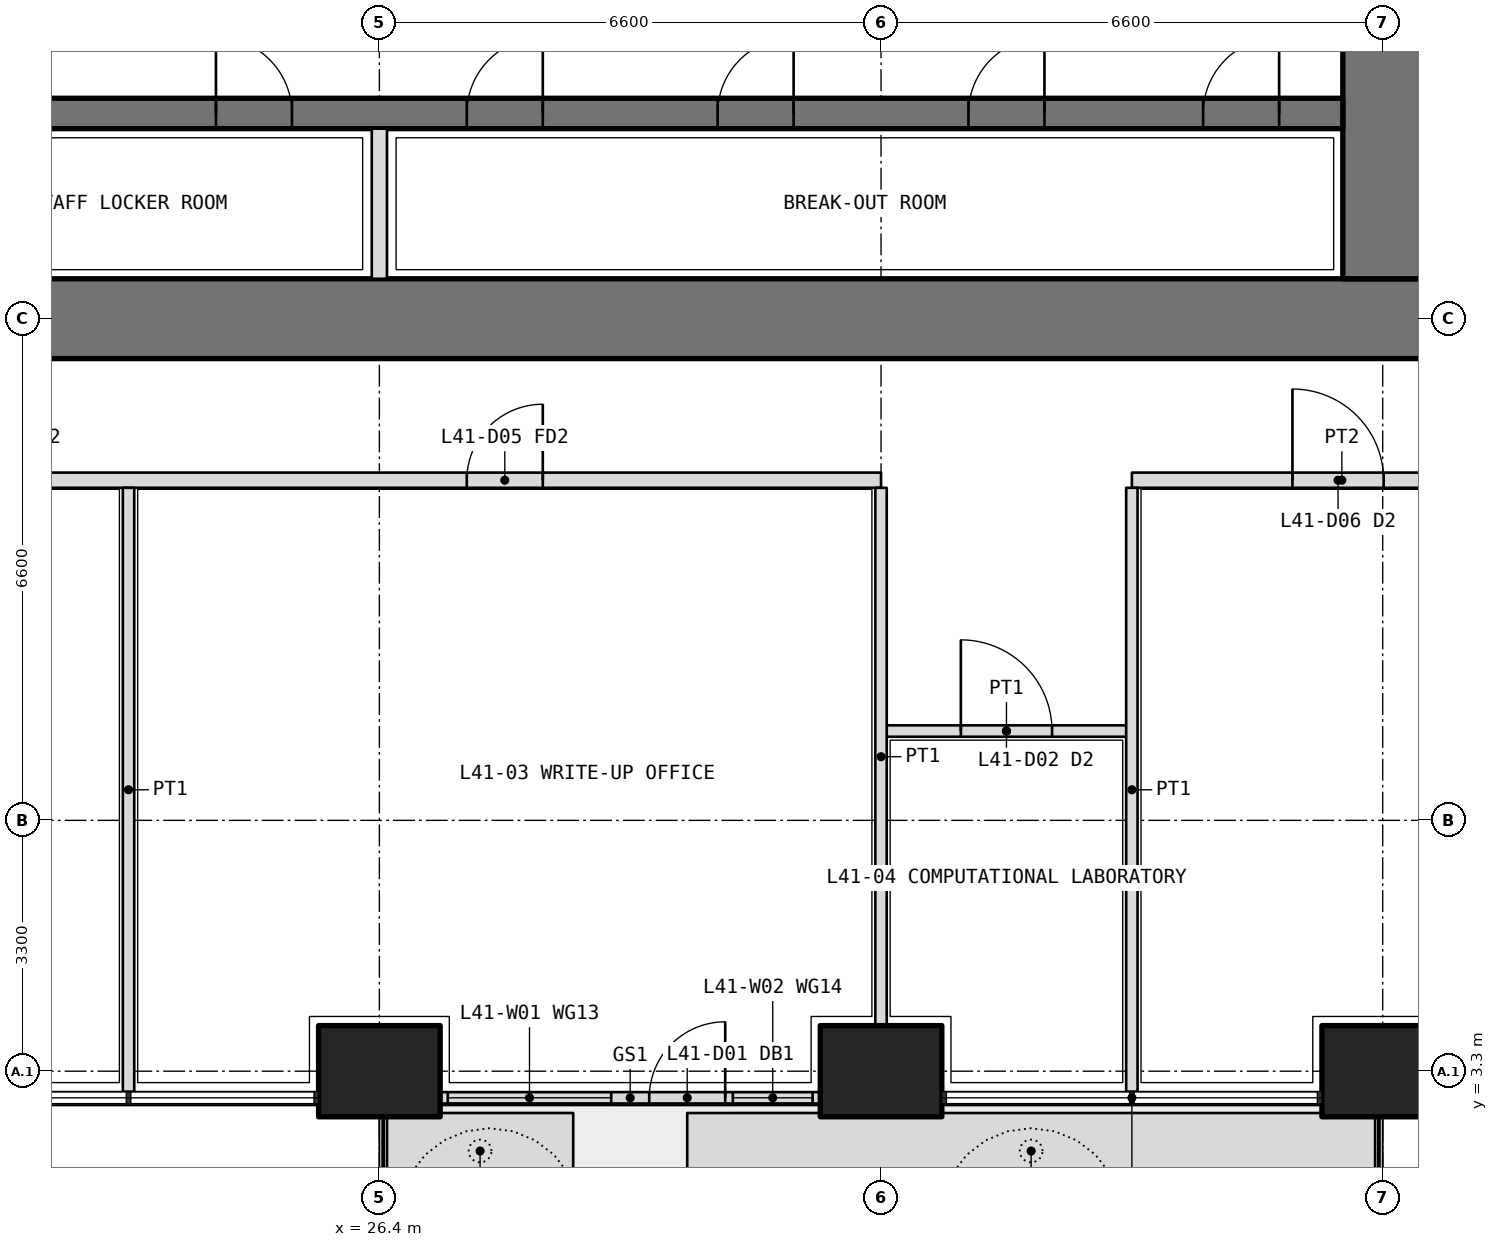
"""IFC4 building model, lengths in metres.
Left out: names, types, materials, properties, quantities, classifications, styles, units other than length and angle.
Written with IfcOpenShell. Run it as: python <this file> out.ifc"""

import sys

from ifc_helpers import new_model, si_unit, direction, frame, frame_2d, origin, origin_2d, place, context, subcontext, project, spatial, polyline, rectangle, outline, extrude, element, fill, save


model = new_model("IFC4")
c1 = context("Model", 3, precision=1e-05, world=origin(), true_north=direction((0.0, 1.0)))
c2 = subcontext(c1, "Body", "Model", "MODEL_VIEW")
j1 = project(units=[si_unit("LENGTHUNIT", "METRE"), si_unit("PLANEANGLEUNIT", "RADIAN")], contexts=[c1])
p1 = place(None, origin())
s1 = spatial("IfcSite", under=j1, at=p1, CompositionType="ELEMENT")
p2 = place(p1, origin())
s2 = spatial("IfcBuilding", under=s1, at=p2, CompositionType="ELEMENT")
p3 = place(p2, frame((0.0, 0.0, 180.9)))
s3 = spatial("IfcBuildingStorey", under=s2, at=p3, CompositionType="ELEMENT", Elevation=180.9)
for number, where, z_axis, x_axis in (
    (1, (26.4, 3.3, 0.0), (0.0, 0.0, 1.0), (1.0, 0.0, 0.0)),
    (2, (33.0, 3.3, 0.0), (0.0, 0.0, 1.0), (1.0, 0.0, 0.0)),
    (3, (39.6, 3.3, 0.0), (0.0, 0.0, 1.0), (1.0, 0.0, 0.0)),
):
    element("IfcColumn", number, at=place(p3, frame(where, z_axis=z_axis, x_axis=x_axis)), inside=s3, PredefinedType="COLUMN", context=c2, shape_type="SweptSolid", body=[
        extrude(rectangle(XDim=1.6, YDim=1.2, at=origin_2d()), origin(), (0.0, 0.0, 1.0), 4.2),
    ])
p4 = place(p3, origin())
e4 = element("IfcWall", 4, at=p4, inside=s3, PredefinedType="USERDEFINED", context=c2, shape_type="SweptSolid", body=[
    extrude(outline(polyline([(26.5, 1.75), (28.95, 1.75), (28.95, 2.75), (26.5, 2.75), (26.5, 1.75)]), holes=[polyline([(26.65, 1.9), (28.8, 1.9), (28.8, 2.6), (26.65, 2.6), (26.65, 1.9)])]), origin(), (0.0, 0.0, 1.0), 1.05),
])
p5 = place(p3, origin())
e5 = element("IfcWall", 5, at=p5, inside=s3, PredefinedType="USERDEFINED", context=c2, shape_type="SweptSolid", body=[
    extrude(outline(polyline([(30.45, 1.75), (39.5, 1.75), (39.5, 2.75), (30.45, 2.75), (30.45, 1.75)]), holes=[polyline([(30.6, 1.9), (39.35, 1.9), (39.35, 2.6), (30.6, 2.6), (30.6, 1.9)])]), origin(), (0.0, 0.0, 1.0), 1.05),
])
p6 = place(p3, frame((27.2, 2.95, 0.0), z_axis=(0.0, 0.0, 1.0), x_axis=(1.0, 0.0, 0.0)))
e6 = element("IfcWall", 6, at=p6, inside=s3, PredefinedType="SOLIDWALL", context=c2, shape_type="SweptSolid", body=[
    extrude(rectangle(XDim=5.0, YDim=0.15, at=frame_2d((2.5, 0.0))), origin(), (0.0, 0.0, 1.0), 2.7),
])
p7 = place(p6, frame((2.75, 0.0, 0.0)))
e7 = element("IfcOpeningElement", 7, at=p7, cuts=e6, PredefinedType="OPENING", context=c2, shape_type="SweptSolid", body=[
    extrude(rectangle(XDim=1.0, YDim=2.4, at=frame_2d((0.5, 1.2))), frame((0.0, 0.085, 0.0), z_axis=(0.0, -1.0, 0.0), x_axis=(1.0, 0.0, 0.0)), (0.0, 0.0, 1.0), 0.17),
])
p8 = place(p6, frame((0.1, 0.0, 0.1)))
e8 = element("IfcOpeningElement", 8, at=p8, cuts=e6, PredefinedType="OPENING", context=c2, shape_type="SweptSolid", body=[
    extrude(rectangle(XDim=2.15, YDim=2.3, at=frame_2d((1.075, 1.15))), frame((0.0, 0.085, 0.0), z_axis=(0.0, -1.0, 0.0), x_axis=(1.0, 0.0, 0.0)), (0.0, 0.0, 1.0), 0.17),
])
p9 = place(p6, frame((3.85, 0.0, 0.1)))
e9 = element("IfcOpeningElement", 9, at=p9, cuts=e6, PredefinedType="OPENING", context=c2, shape_type="SweptSolid", body=[
    extrude(rectangle(XDim=1.05, YDim=2.3, at=frame_2d((0.525, 1.15))), frame((0.0, 0.085, 0.0), z_axis=(0.0, -1.0, 0.0), x_axis=(1.0, 0.0, 0.0)), (0.0, 0.0, 1.0), 0.17),
])
p10 = place(p3, frame((12.675, 13.2, 0.0), z_axis=(0.0, 0.0, 1.0), x_axis=(1.0, 0.0, 0.0)))
e10 = element("IfcWall", 10, at=p10, inside=s3, PredefinedType="SHEAR", context=c2, shape_type="SweptSolid", body=[
    extrude(rectangle(XDim=27.45, YDim=1.05, at=frame_2d((13.725, 0.0))), origin(), (0.0, 0.0, 1.0), 4.2),
])
p11 = place(p3, frame((39.6, 13.725, 0.0), z_axis=(0.0, 0.0, 1.0), x_axis=(0.0, 1.0, 0.0)))
e11 = element("IfcWall", 11, at=p11, inside=s3, PredefinedType="SHEAR", context=c2, shape_type="SweptSolid", body=[
    extrude(rectangle(XDim=18.75, YDim=1.05, at=frame_2d((9.375, 0.0))), origin(), (0.0, 0.0, 1.0), 4.2),
])
p12 = place(p11, frame((3.025, 0.0, 0.0)))
e12 = element("IfcOpeningElement", 12, at=p12, cuts=e11, PredefinedType="OPENING", context=c2, shape_type="SweptSolid", body=[
    extrude(rectangle(XDim=1.6, YDim=2.1, at=frame_2d((0.8, 1.05))), frame((0.0, 0.535, 0.0), z_axis=(0.0, -1.0, 0.0), x_axis=(1.0, 0.0, 0.0)), (0.0, 0.0, 1.0), 1.07),
])
p13 = place(p11, frame((13.825, 0.0, 0.0)))
e13 = element("IfcOpeningElement", 13, at=p13, cuts=e11, PredefinedType="OPENING", context=c2, shape_type="SweptSolid", body=[
    extrude(rectangle(XDim=1.6, YDim=2.1, at=frame_2d((0.8, 1.05))), frame((0.0, 0.535, 0.0), z_axis=(0.0, -1.0, 0.0), x_axis=(1.0, 0.0, 0.0)), (0.0, 0.0, 1.0), 1.07),
])
p14 = place(p3, frame((13.725, 15.9, 0.0), z_axis=(0.0, 0.0, 1.0), x_axis=(1.0, 0.0, 0.0)))
e14 = element("IfcWall", 14, at=p14, inside=s3, PredefinedType="SHEAR", context=c2, shape_type="SweptSolid", body=[
    extrude(rectangle(XDim=25.35, YDim=0.4, at=frame_2d((12.675, 0.0))), origin(), (0.0, 0.0, 1.0), 4.2),
])
p15 = place(p14, frame((0.837, 0.0, 0.0)))
e15 = element("IfcOpeningElement", 15, at=p15, cuts=e14, PredefinedType="OPENING", context=c2, shape_type="SweptSolid", body=[
    extrude(rectangle(XDim=1.0, YDim=2.1, at=frame_2d((0.5, 1.05))), frame((0.0, 0.21, 0.0), z_axis=(0.0, -1.0, 0.0), x_axis=(1.0, 0.0, 0.0)), (0.0, 0.0, 1.0), 0.42),
])
p16 = place(p14, frame((3.925, 0.0, 0.0)))
e16 = element("IfcOpeningElement", 16, at=p16, cuts=e14, PredefinedType="OPENING", context=c2, shape_type="SweptSolid", body=[
    extrude(rectangle(XDim=1.0, YDim=2.1, at=frame_2d((0.5, 1.05))), frame((0.0, 0.21, 0.0), z_axis=(0.0, -1.0, 0.0), x_axis=(1.0, 0.0, 0.0)), (0.0, 0.0, 1.0), 0.42),
])
p17 = place(p14, frame((7.225, 0.0, 0.0)))
e17 = element("IfcOpeningElement", 17, at=p17, cuts=e14, PredefinedType="OPENING", context=c2, shape_type="SweptSolid", body=[
    extrude(rectangle(XDim=1.0, YDim=2.1, at=frame_2d((0.5, 1.05))), frame((0.0, 0.21, 0.0), z_axis=(0.0, -1.0, 0.0), x_axis=(1.0, 0.0, 0.0)), (0.0, 0.0, 1.0), 0.42),
])
p18 = place(p14, frame((10.525, 0.0, 0.0)))
e18 = element("IfcOpeningElement", 18, at=p18, cuts=e14, PredefinedType="OPENING", context=c2, shape_type="SweptSolid", body=[
    extrude(rectangle(XDim=1.0, YDim=2.1, at=frame_2d((0.5, 1.05))), frame((0.0, 0.21, 0.0), z_axis=(0.0, -1.0, 0.0), x_axis=(1.0, 0.0, 0.0)), (0.0, 0.0, 1.0), 0.42),
])
p19 = place(p14, frame((13.825, 0.0, 0.0)))
e19 = element("IfcOpeningElement", 19, at=p19, cuts=e14, PredefinedType="OPENING", context=c2, shape_type="SweptSolid", body=[
    extrude(rectangle(XDim=1.0, YDim=2.1, at=frame_2d((0.5, 1.05))), frame((0.0, 0.21, 0.0), z_axis=(0.0, -1.0, 0.0), x_axis=(1.0, 0.0, 0.0)), (0.0, 0.0, 1.0), 0.42),
])
p20 = place(p14, frame((17.125, 0.0, 0.0)))
e20 = element("IfcOpeningElement", 20, at=p20, cuts=e14, PredefinedType="OPENING", context=c2, shape_type="SweptSolid", body=[
    extrude(rectangle(XDim=1.0, YDim=2.1, at=frame_2d((0.5, 1.05))), frame((0.0, 0.21, 0.0), z_axis=(0.0, -1.0, 0.0), x_axis=(1.0, 0.0, 0.0)), (0.0, 0.0, 1.0), 0.42),
])
p21 = place(p14, frame((20.425, 0.0, 0.0)))
e21 = element("IfcOpeningElement", 21, at=p21, cuts=e14, PredefinedType="OPENING", context=c2, shape_type="SweptSolid", body=[
    extrude(rectangle(XDim=1.0, YDim=2.1, at=frame_2d((0.5, 1.05))), frame((0.0, 0.21, 0.0), z_axis=(0.0, -1.0, 0.0), x_axis=(1.0, 0.0, 0.0)), (0.0, 0.0, 1.0), 0.42),
])
p22 = place(p14, frame((23.512, 0.0, 0.0)))
e22 = element("IfcOpeningElement", 22, at=p22, cuts=e14, PredefinedType="OPENING", context=c2, shape_type="SweptSolid", body=[
    extrude(rectangle(XDim=1.0, YDim=2.1, at=frame_2d((0.5, 1.05))), frame((0.0, 0.21, 0.0), z_axis=(0.0, -1.0, 0.0), x_axis=(1.0, 0.0, 0.0)), (0.0, 0.0, 1.0), 0.42),
])
p23 = place(p3, frame((26.4, 13.725, 0.0), z_axis=(0.0, 0.0, 1.0), x_axis=(0.0, 1.0, 0.0)))
e23 = element("IfcWall", 23, at=p23, inside=s3, PredefinedType="PARTITIONING", context=c2, shape_type="SweptSolid", body=[
    extrude(rectangle(XDim=1.975, YDim=0.2, at=frame_2d((0.987, 0.0))), origin(), (0.0, 0.0, 1.0), 4.2),
])
p24 = place(p3, frame((10.975, 11.075, 0.0), z_axis=(0.0, 0.0, 1.0), x_axis=(1.0, 0.0, 0.0)))
e24 = element("IfcWall", 24, at=p24, inside=s3, PredefinedType="PARTITIONING", context=c2, shape_type="SweptSolid", body=[
    extrude(rectangle(XDim=22.025, YDim=0.2, at=frame_2d((11.012, 0.0))), origin(), (0.0, 0.0, 1.0), 2.85),
])
p25 = place(p24, frame((0.562, 0.0, 0.0)))
e25 = element("IfcOpeningElement", 25, at=p25, cuts=e24, PredefinedType="OPENING", context=c2, shape_type="SweptSolid", body=[
    extrude(rectangle(XDim=1.2, YDim=2.1, at=frame_2d((0.6, 1.05))), frame((0.0, 0.11, 0.0), z_axis=(0.0, -1.0, 0.0), x_axis=(1.0, 0.0, 0.0)), (0.0, 0.0, 1.0), 0.22),
])
p26 = place(p24, frame((6.675, 0.0, 0.0)))
e26 = element("IfcOpeningElement", 26, at=p26, cuts=e24, PredefinedType="OPENING", context=c2, shape_type="SweptSolid", body=[
    extrude(rectangle(XDim=1.0, YDim=2.1, at=frame_2d((0.5, 1.05))), frame((0.0, 0.11, 0.0), z_axis=(0.0, -1.0, 0.0), x_axis=(1.0, 0.0, 0.0)), (0.0, 0.0, 1.0), 0.22),
])
p27 = place(p24, frame((16.575, 0.0, 0.0)))
e27 = element("IfcOpeningElement", 27, at=p27, cuts=e24, PredefinedType="OPENING", context=c2, shape_type="SweptSolid", body=[
    extrude(rectangle(XDim=1.0, YDim=2.1, at=frame_2d((0.5, 1.05))), frame((0.0, 0.11, 0.0), z_axis=(0.0, -1.0, 0.0), x_axis=(1.0, 0.0, 0.0)), (0.0, 0.0, 1.0), 0.22),
])
p28 = place(p3, frame((36.3, 11.075, 0.0), z_axis=(0.0, 0.0, 1.0), x_axis=(1.0, 0.0, 0.0)))
e28 = element("IfcWall", 28, at=p28, inside=s3, PredefinedType="PARTITIONING", context=c2, shape_type="SweptSolid", body=[
    extrude(rectangle(XDim=5.525, YDim=0.2, at=frame_2d((2.762, 0.0))), origin(), (0.0, 0.0, 1.0), 2.85),
])
p29 = place(p28, frame((2.113, 0.0, 0.0)))
e29 = element("IfcOpeningElement", 29, at=p29, cuts=e28, PredefinedType="OPENING", context=c2, shape_type="SweptSolid", body=[
    extrude(rectangle(XDim=1.2, YDim=2.1, at=frame_2d((0.6, 1.05))), frame((0.0, 0.11, 0.0), z_axis=(0.0, -1.0, 0.0), x_axis=(1.0, 0.0, 0.0)), (0.0, 0.0, 1.0), 0.22),
])
p30 = place(p3, frame((33.0, 7.775, 0.0), z_axis=(0.0, 0.0, 1.0), x_axis=(1.0, 0.0, 0.0)))
e30 = element("IfcWall", 30, at=p30, inside=s3, PredefinedType="PARTITIONING", context=c2, shape_type="SweptSolid", body=[
    extrude(rectangle(XDim=3.3, YDim=0.15, at=frame_2d((1.65, 0.0))), origin(), (0.0, 0.0, 1.0), 2.85),
])
p31 = place(p30, frame((1.05, 0.0, 0.0)))
e31 = element("IfcOpeningElement", 31, at=p31, cuts=e30, PredefinedType="OPENING", context=c2, shape_type="SweptSolid", body=[
    extrude(rectangle(XDim=1.2, YDim=2.1, at=frame_2d((0.6, 1.05))), frame((0.0, 0.085, 0.0), z_axis=(0.0, -1.0, 0.0), x_axis=(1.0, 0.0, 0.0)), (0.0, 0.0, 1.0), 0.17),
])
p32 = place(p3, frame((23.1, 3.03, 0.0), z_axis=(0.0, 0.0, 1.0), x_axis=(0.0, 1.0, 0.0)))
e32 = element("IfcWall", 32, at=p32, inside=s3, PredefinedType="PARTITIONING", context=c2, shape_type="SweptSolid", body=[
    extrude(rectangle(XDim=7.945, YDim=0.15, at=frame_2d((3.973, 0.0))), origin(), (0.0, 0.0, 1.0), 2.7),
])
p33 = place(p3, frame((33.0, 3.9, 0.0), z_axis=(0.0, 0.0, 1.0), x_axis=(0.0, 1.0, 0.0)))
e33 = element("IfcWall", 33, at=p33, inside=s3, PredefinedType="PARTITIONING", context=c2, shape_type="SweptSolid", body=[
    extrude(rectangle(XDim=7.075, YDim=0.15, at=frame_2d((3.538, 0.0))), origin(), (0.0, 0.0, 1.0), 2.85),
])
p34 = place(p3, frame((36.3, 3.03, 0.0), z_axis=(0.0, 0.0, 1.0), x_axis=(0.0, 1.0, 0.0)))
e34 = element("IfcWall", 34, at=p34, inside=s3, PredefinedType="PARTITIONING", context=c2, shape_type="SweptSolid", body=[
    extrude(rectangle(XDim=7.945, YDim=0.15, at=frame_2d((3.973, 0.0))), origin(), (0.0, 0.0, 1.0), 2.7),
])
p35 = place(p7, origin())
e35 = element("IfcDoor", 35, at=p35, inside=s3, OperationType="SINGLE_SWING_RIGHT", PredefinedType="DOOR", context=c2, shape_type="SweptSolid", body=[
    extrude(rectangle(XDim=1.0, YDim=2.4, at=frame_2d((0.5, 1.2))), frame((0.0, 0.025, 0.0), z_axis=(0.0, -1.0, 0.0), x_axis=(1.0, 0.0, 0.0)), (0.0, 0.0, 1.0), 0.05),
])
fill(e7, e35)
p36 = place(p8, origin())
e36 = element("IfcWindow", 36, at=p36, inside=s3, PartitioningType="SINGLE_PANEL", PredefinedType="WINDOW", context=c2, shape_type="SweptSolid", body=[
    extrude(rectangle(XDim=2.15, YDim=2.3, at=frame_2d((1.075, 1.15))), frame((0.0, 0.03, 0.0), z_axis=(0.0, -1.0, 0.0), x_axis=(1.0, 0.0, 0.0)), (0.0, 0.0, 1.0), 0.06),
])
fill(e8, e36)
p37 = place(p9, origin())
e37 = element("IfcWindow", 37, at=p37, inside=s3, PartitioningType="SINGLE_PANEL", PredefinedType="WINDOW", context=c2, shape_type="SweptSolid", body=[
    extrude(rectangle(XDim=1.05, YDim=2.3, at=frame_2d((0.525, 1.15))), frame((0.0, 0.03, 0.0), z_axis=(0.0, -1.0, 0.0), x_axis=(1.0, 0.0, 0.0)), (0.0, 0.0, 1.0), 0.06),
])
fill(e9, e37)
p38 = place(p27, origin())
e38 = element("IfcDoor", 38, at=p38, inside=s3, OperationType="SINGLE_SWING_RIGHT", PredefinedType="DOOR", context=c2, shape_type="SweptSolid", body=[
    extrude(rectangle(XDim=1.0, YDim=2.1, at=frame_2d((0.5, 1.05))), frame((0.0, 0.025, 0.0), z_axis=(0.0, -1.0, 0.0), x_axis=(1.0, 0.0, 0.0)), (0.0, 0.0, 1.0), 0.05),
])
fill(e27, e38)
p39 = place(p31, origin())
e39 = element("IfcDoor", 39, at=p39, inside=s3, OperationType="DOUBLE_DOOR_SINGLE_SWING", PredefinedType="DOOR", context=c2, shape_type="SweptSolid", body=[
    extrude(rectangle(XDim=1.2, YDim=2.1, at=frame_2d((0.6, 1.05))), frame((0.0, 0.025, 0.0), z_axis=(0.0, -1.0, 0.0), x_axis=(1.0, 0.0, 0.0)), (0.0, 0.0, 1.0), 0.05),
])
fill(e31, e39)
p40 = place(p29, origin())
e40 = element("IfcDoor", 40, at=p40, inside=s3, OperationType="DOUBLE_DOOR_SINGLE_SWING", PredefinedType="DOOR", context=c2, shape_type="SweptSolid", body=[
    extrude(rectangle(XDim=1.2, YDim=2.1, at=frame_2d((0.6, 1.05))), frame((0.0, 0.025, 0.0), z_axis=(0.0, -1.0, 0.0), x_axis=(1.0, 0.0, 0.0)), (0.0, 0.0, 1.0), 0.05),
])
fill(e29, e40)
p41 = place(p18, origin())
e41 = element("IfcDoor", 41, at=p41, inside=s3, OperationType="SINGLE_SWING_LEFT", PredefinedType="DOOR", context=c2, shape_type="SweptSolid", body=[
    extrude(rectangle(XDim=1.0, YDim=2.1, at=frame_2d((0.5, 1.05))), frame((0.0, 0.025, 0.0), z_axis=(0.0, -1.0, 0.0), x_axis=(1.0, 0.0, 0.0)), (0.0, 0.0, 1.0), 0.05),
])
fill(e18, e41)
p42 = place(p19, origin())
e42 = element("IfcDoor", 42, at=p42, inside=s3, OperationType="SINGLE_SWING_RIGHT", PredefinedType="DOOR", context=c2, shape_type="SweptSolid", body=[
    extrude(rectangle(XDim=1.0, YDim=2.1, at=frame_2d((0.5, 1.05))), frame((0.0, 0.025, 0.0), z_axis=(0.0, -1.0, 0.0), x_axis=(1.0, 0.0, 0.0)), (0.0, 0.0, 1.0), 0.05),
])
fill(e19, e42)
p43 = place(p20, origin())
e43 = element("IfcDoor", 43, at=p43, inside=s3, OperationType="SINGLE_SWING_RIGHT", PredefinedType="DOOR", context=c2, shape_type="SweptSolid", body=[
    extrude(rectangle(XDim=1.0, YDim=2.1, at=frame_2d((0.5, 1.05))), frame((0.0, 0.025, 0.0), z_axis=(0.0, -1.0, 0.0), x_axis=(1.0, 0.0, 0.0)), (0.0, 0.0, 1.0), 0.05),
])
fill(e20, e43)
p44 = place(p21, origin())
e44 = element("IfcDoor", 44, at=p44, inside=s3, OperationType="SINGLE_SWING_RIGHT", PredefinedType="DOOR", context=c2, shape_type="SweptSolid", body=[
    extrude(rectangle(XDim=1.0, YDim=2.1, at=frame_2d((0.5, 1.05))), frame((0.0, 0.025, 0.0), z_axis=(0.0, -1.0, 0.0), x_axis=(1.0, 0.0, 0.0)), (0.0, 0.0, 1.0), 0.05),
])
fill(e21, e44)
p45 = place(p22, origin())
e45 = element("IfcDoor", 45, at=p45, inside=s3, OperationType="SINGLE_SWING_RIGHT", PredefinedType="DOOR", context=c2, shape_type="SweptSolid", body=[
    extrude(rectangle(XDim=1.0, YDim=2.1, at=frame_2d((0.5, 1.05))), frame((0.0, 0.025, 0.0), z_axis=(0.0, -1.0, 0.0), x_axis=(1.0, 0.0, 0.0)), (0.0, 0.0, 1.0), 0.05),
])
fill(e22, e45)
save(model, sys.argv[1])
